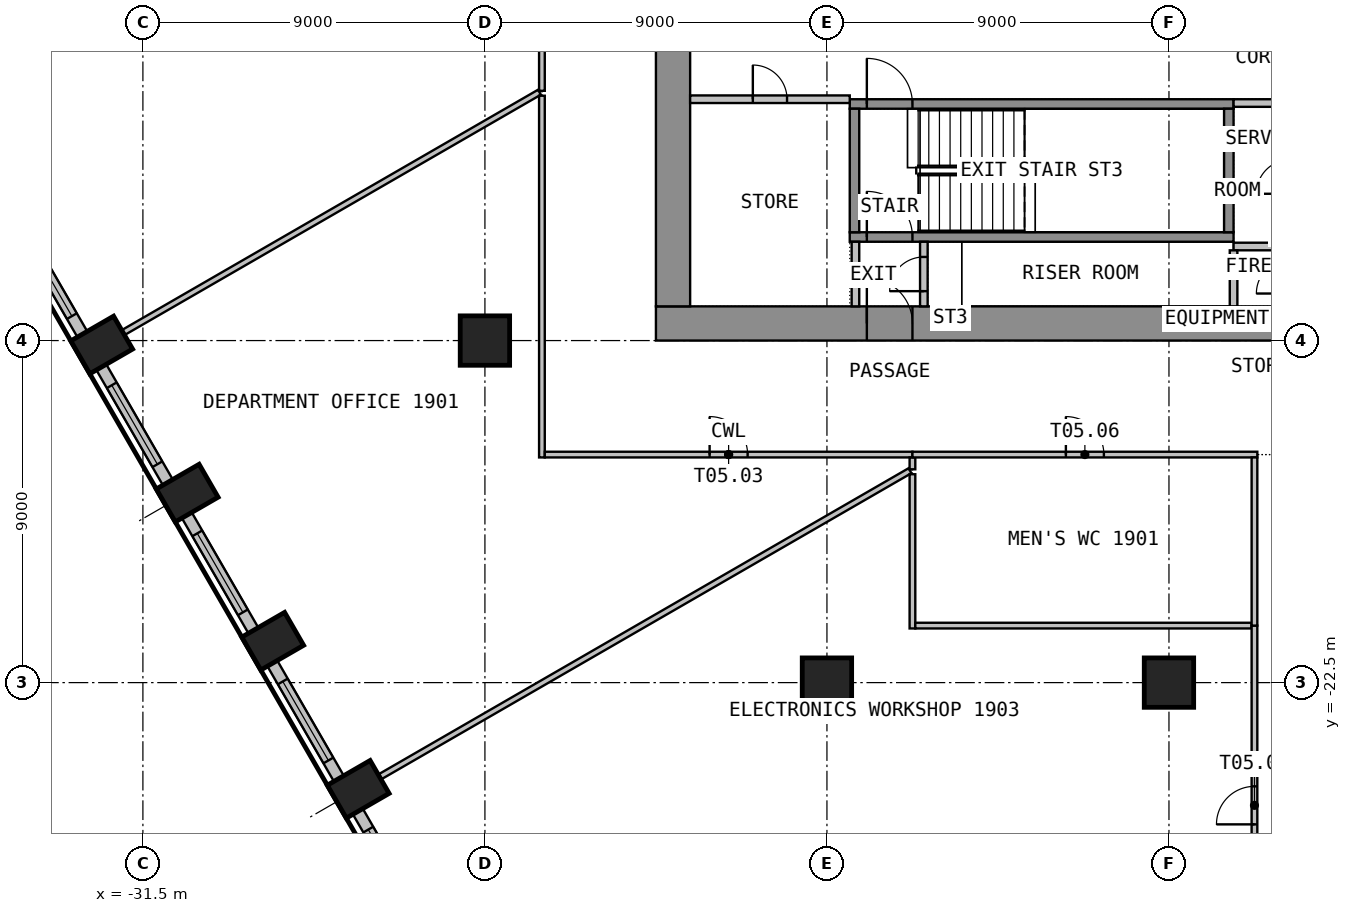
"""IFC4 building model, lengths in metres.
Left out: names, types, materials, properties, quantities, classifications, styles, units other than length and angle.
Written with IfcOpenShell. Run it as: python <this file> out.ifc"""

import sys

from ifc_helpers import new_model, si_unit, direction, frame, frame_2d, origin, origin_2d, place, context, subcontext, project, spatial, rectangle, circle, extrude, element, fill, save


model = new_model("IFC4")
c1 = context("Model", 3, precision=1e-05, world=origin(), true_north=direction((0.0, 1.0)))
c2 = subcontext(c1, "Body", "Model", "MODEL_VIEW")
j1 = project(units=[si_unit("LENGTHUNIT", "METRE"), si_unit("PLANEANGLEUNIT", "RADIAN")], contexts=[c1])
p1 = place(None, origin())
s1 = spatial("IfcSite", under=j1, at=p1, CompositionType="ELEMENT")
p2 = place(p1, origin())
s2 = spatial("IfcBuilding", under=s1, at=p2, CompositionType="ELEMENT")
p3 = place(p2, frame((0.0, 0.0, 81.3)))
s3 = spatial("IfcBuildingStorey", under=s2, at=p3, CompositionType="ELEMENT", Elevation=81.3)
for number, where, z_axis, x_axis in (
    (1, (-32.584, -13.616, 0.0), (0.0, 0.0, 1.0), (0.5, -0.866, 0.0)),
    (2, (-30.334, -17.513, 0.0), (0.0, 0.0, 1.0), (0.5, -0.866, 0.0)),
    (3, (-28.084, -21.411, 0.0), (0.0, 0.0, 1.0), (0.5, -0.866, 0.0)),
    (4, (-25.834, -25.308, 0.0), (0.0, 0.0, 1.0), (0.5, -0.866, 0.0)),
):
    element("IfcColumn", number, at=place(p3, frame(where, z_axis=z_axis, x_axis=x_axis)), inside=s3, PredefinedType="COLUMN", context=c2, shape_type="SweptSolid", body=[
        extrude(rectangle(XDim=1.0, YDim=1.3, at=origin_2d()), origin(), (0.0, 0.0, 1.0), 3.525),
    ])
for number, where, z_axis, x_axis in (
    (5, (-22.5, -13.5, 0.0), (0.0, 0.0, 1.0), (1.0, 0.0, 0.0)),
    (6, (-13.5, -22.5, 0.0), (0.0, 0.0, 1.0), (1.0, 0.0, 0.0)),
    (7, (-4.5, -22.5, 0.0), (0.0, 0.0, 1.0), (1.0, 0.0, 0.0)),
):
    element("IfcColumn", number, at=place(p3, frame(where, z_axis=z_axis, x_axis=x_axis)), inside=s3, PredefinedType="COLUMN", context=c2, shape_type="SweptSolid", body=[
        extrude(circle(Radius=0.65, at=origin_2d()), origin(), (0.0, 0.0, 1.0), 3.525),
    ])
p4 = place(p3, frame((-34.844, -10.303, 0.0), z_axis=(0.0, 0.0, 1.0), x_axis=(0.499996256241, -0.866027565234, 0.0)))
e8 = element("IfcWall", 8, at=p4, inside=s3, PredefinedType="SOLIDWALL", context=c2, shape_type="SweptSolid", body=[
    extrude(rectangle(XDim=3.499, YDim=0.3, at=frame_2d((1.75, 0.0))), origin(), (0.0, 0.0, 1.0), 3.525),
])
p5 = place(p4, frame((0.55, 0.0, 0.9)))
e9 = element("IfcOpeningElement", 9, at=p5, cuts=e8, PredefinedType="OPENING", context=c2, shape_type="SweptSolid", body=[
    extrude(rectangle(XDim=2.4, YDim=2.1, at=frame_2d((1.2, 1.05))), frame((0.0, 0.16, 0.0), z_axis=(0.0, -1.0, 0.0), x_axis=(1.0, 0.0, 0.0)), (0.0, 0.0, 1.0), 0.32),
])
p6 = place(p3, frame((-32.594, -14.2, 0.0), z_axis=(0.0, 0.0, 1.0), x_axis=(0.499996256241, -0.866027565234, 0.0)))
e10 = element("IfcWall", 10, at=p6, inside=s3, PredefinedType="SOLIDWALL", context=c2, shape_type="SweptSolid", body=[
    extrude(rectangle(XDim=3.499, YDim=0.3, at=frame_2d((1.75, 0.0))), origin(), (0.0, 0.0, 1.0), 3.525),
])
p7 = place(p6, frame((0.55, 0.0, 0.9)))
e11 = element("IfcOpeningElement", 11, at=p7, cuts=e10, PredefinedType="OPENING", context=c2, shape_type="SweptSolid", body=[
    extrude(rectangle(XDim=2.4, YDim=2.1, at=frame_2d((1.2, 1.05))), frame((0.0, 0.16, 0.0), z_axis=(0.0, -1.0, 0.0), x_axis=(1.0, 0.0, 0.0)), (0.0, 0.0, 1.0), 0.32),
])
p8 = place(p3, frame((-30.344, -18.097, 0.0), z_axis=(0.0, 0.0, 1.0), x_axis=(0.499996256241, -0.866027565234, 0.0)))
e12 = element("IfcWall", 12, at=p8, inside=s3, PredefinedType="SOLIDWALL", context=c2, shape_type="SweptSolid", body=[
    extrude(rectangle(XDim=3.499, YDim=0.3, at=frame_2d((1.75, 0.0))), origin(), (0.0, 0.0, 1.0), 3.525),
])
p9 = place(p8, frame((0.55, 0.0, 0.9)))
e13 = element("IfcOpeningElement", 13, at=p9, cuts=e12, PredefinedType="OPENING", context=c2, shape_type="SweptSolid", body=[
    extrude(rectangle(XDim=2.4, YDim=2.1, at=frame_2d((1.2, 1.05))), frame((0.0, 0.16, 0.0), z_axis=(0.0, -1.0, 0.0), x_axis=(1.0, 0.0, 0.0)), (0.0, 0.0, 1.0), 0.32),
])
p10 = place(p3, frame((-28.094, -21.994, 0.0), z_axis=(0.0, 0.0, 1.0), x_axis=(0.499996256241, -0.866027565234, 0.0)))
e14 = element("IfcWall", 14, at=p10, inside=s3, PredefinedType="SOLIDWALL", context=c2, shape_type="SweptSolid", body=[
    extrude(rectangle(XDim=3.499, YDim=0.3, at=frame_2d((1.75, 0.0))), origin(), (0.0, 0.0, 1.0), 3.525),
])
p11 = place(p10, frame((0.55, 0.0, 0.9)))
e15 = element("IfcOpeningElement", 15, at=p11, cuts=e14, PredefinedType="OPENING", context=c2, shape_type="SweptSolid", body=[
    extrude(rectangle(XDim=2.4, YDim=2.1, at=frame_2d((1.2, 1.05))), frame((0.0, 0.16, 0.0), z_axis=(0.0, -1.0, 0.0), x_axis=(1.0, 0.0, 0.0)), (0.0, 0.0, 1.0), 0.32),
])
p12 = place(p3, frame((-25.844, -25.891, 0.0), z_axis=(0.0, 0.0, 1.0), x_axis=(0.500004907028, -0.866022570692, 0.0)))
e16 = element("IfcWall", 16, at=p12, inside=s3, PredefinedType="SOLIDWALL", context=c2, shape_type="SweptSolid", body=[
    extrude(rectangle(XDim=3.192, YDim=0.3, at=frame_2d((1.596, 0.0))), origin(), (0.0, 0.0, 1.0), 3.525),
])
p13 = place(p12, frame((0.55, 0.0, 0.9)))
e17 = element("IfcOpeningElement", 17, at=p13, cuts=e16, PredefinedType="OPENING", context=c2, shape_type="SweptSolid", body=[
    extrude(rectangle(XDim=2.4, YDim=2.1, at=frame_2d((1.2, 1.05))), frame((0.0, 0.16, 0.0), z_axis=(0.0, -1.0, 0.0), x_axis=(1.0, 0.0, 0.0)), (0.0, 0.0, 1.0), 0.32),
])
p14 = place(p3, frame((-18.0, -13.05, 0.0), z_axis=(0.0, 0.0, 1.0), x_axis=(1.0, 0.0, 0.0)))
e18 = element("IfcWall", 18, at=p14, inside=s3, PredefinedType="SHEAR", context=c2, shape_type="SweptSolid", body=[
    extrude(rectangle(XDim=36.0, YDim=0.9, at=frame_2d((18.0, 0.0))), origin(), (0.0, 0.0, 1.0), 3.525),
])
p15 = place(p14, frame((16.8, 0.0, 0.0)))
e19 = element("IfcOpeningElement", 19, at=p15, cuts=e18, PredefinedType="OPENING", context=c2, shape_type="SweptSolid", body=[
    extrude(rectangle(XDim=2.4, YDim=2.1, at=frame_2d((1.2, 1.05))), frame((0.0, 0.46, 0.0), z_axis=(0.0, -1.0, 0.0), x_axis=(1.0, 0.0, 0.0)), (0.0, 0.0, 1.0), 0.92),
])
p16 = place(p14, frame((5.55, 0.0, 0.0)))
e20 = element("IfcOpeningElement", 20, at=p16, cuts=e18, PredefinedType="OPENING", context=c2, shape_type="SweptSolid", body=[
    extrude(rectangle(XDim=1.2, YDim=2.1, at=frame_2d((0.6, 1.05))), frame((0.0, 0.46, 0.0), z_axis=(0.0, -1.0, 0.0), x_axis=(1.0, 0.0, 0.0)), (0.0, 0.0, 1.0), 0.92),
])
p17 = place(p14, frame((29.25, 0.0, 0.0)))
e21 = element("IfcOpeningElement", 21, at=p17, cuts=e18, PredefinedType="OPENING", context=c2, shape_type="SweptSolid", body=[
    extrude(rectangle(XDim=1.2, YDim=2.1, at=frame_2d((0.6, 1.05))), frame((0.0, 0.46, 0.0), z_axis=(0.0, -1.0, 0.0), x_axis=(1.0, 0.0, 0.0)), (0.0, 0.0, 1.0), 0.92),
])
p18 = place(p3, frame((-17.55, -12.6, 0.0), z_axis=(0.0, 0.0, 1.0), x_axis=(0.0, 1.0, 0.0)))
e22 = element("IfcWall", 22, at=p18, inside=s3, PredefinedType="SHEAR", context=c2, shape_type="SweptSolid", body=[
    extrude(rectangle(XDim=25.2, YDim=0.9, at=frame_2d((12.6, 0.0))), origin(), (0.0, 0.0, 1.0), 3.525),
])
p19 = place(p18, frame((11.4, 0.0, 0.0)))
e23 = element("IfcOpeningElement", 23, at=p19, cuts=e22, PredefinedType="OPENING", context=c2, shape_type="SweptSolid", body=[
    extrude(rectangle(XDim=2.4, YDim=2.1, at=frame_2d((1.2, 1.05))), frame((0.0, 0.46, 0.0), z_axis=(0.0, -1.0, 0.0), x_axis=(1.0, 0.0, 0.0)), (0.0, 0.0, 1.0), 0.92),
])
p20 = place(p3, frame((-12.9, -10.775, 0.0), z_axis=(0.0, 0.0, 1.0), x_axis=(1.0, 0.0, 0.0)))
e24 = element("IfcWall", 24, at=p20, inside=s3, PredefinedType="SHEAR", context=c2, shape_type="SweptSolid", body=[
    extrude(rectangle(XDim=10.1, YDim=0.25, at=frame_2d((5.05, 0.0))), origin(), (0.0, 0.0, 1.0), 3.525),
])
p21 = place(p20, frame((0.45, 0.0, 0.0)))
e25 = element("IfcOpeningElement", 25, at=p21, cuts=e24, PredefinedType="OPENING", context=c2, shape_type="SweptSolid", body=[
    extrude(rectangle(XDim=1.2, YDim=2.1, at=frame_2d((0.6, 1.05))), frame((0.0, 0.135, 0.0), z_axis=(0.0, -1.0, 0.0), x_axis=(1.0, 0.0, 0.0)), (0.0, 0.0, 1.0), 0.27),
])
p22 = place(p3, frame((-12.9, -7.275, 0.0), z_axis=(0.0, 0.0, 1.0), x_axis=(1.0, 0.0, 0.0)))
e26 = element("IfcWall", 26, at=p22, inside=s3, PredefinedType="SHEAR", context=c2, shape_type="SweptSolid", body=[
    extrude(rectangle(XDim=10.1, YDim=0.25, at=frame_2d((5.05, 0.0))), origin(), (0.0, 0.0, 1.0), 3.525),
])
p23 = place(p22, frame((0.45, 0.0, 0.0)))
e27 = element("IfcOpeningElement", 27, at=p23, cuts=e26, PredefinedType="OPENING", context=c2, shape_type="SweptSolid", body=[
    extrude(rectangle(XDim=1.2, YDim=2.1, at=frame_2d((0.6, 1.05))), frame((0.0, 0.135, 0.0), z_axis=(0.0, -1.0, 0.0), x_axis=(1.0, 0.0, 0.0)), (0.0, 0.0, 1.0), 0.27),
])
for number, where, z_axis, x_axis in (
    (28, (-12.775, -10.65, 0.0), (0.0, 0.0, 1.0), (0.0, 1.0, 0.0)),
    (29, (-2.925, -10.65, 0.0), (0.0, 0.0, 1.0), (0.0, 1.0, 0.0)),
):
    element("IfcWall", number, at=place(p3, frame(where, z_axis=z_axis, x_axis=x_axis)), inside=s3, PredefinedType="SHEAR", context=c2, shape_type="SweptSolid", body=[
        extrude(rectangle(XDim=3.25, YDim=0.25, at=frame_2d((1.625, 0.0))), origin(), (0.0, 0.0, 1.0), 3.525),
    ])
for number, where, z_axis, x_axis in (
    (30, (-2.8, -7.25, 0.0), (0.0, 0.0, 1.0), (1.0, 0.0, 0.0)),
    (31, (-2.8, -11.025, 0.0), (0.0, 0.0, 1.0), (1.0, 0.0, 0.0)),
):
    element("IfcWall", number, at=place(p3, frame(where, z_axis=z_axis, x_axis=x_axis)), inside=s3, PredefinedType="PARTITIONING", context=c2, shape_type="SweptSolid", body=[
        extrude(rectangle(XDim=1.4, YDim=0.2, at=frame_2d((0.7, 0.0))), origin(), (0.0, 0.0, 1.0), 3.525),
    ])
p24 = place(p3, frame((-12.75, -12.6, 0.0), z_axis=(0.0, 0.0, 1.0), x_axis=(0.0, 1.0, 0.0)))
e32 = element("IfcWall", 32, at=p24, inside=s3, PredefinedType="PARTITIONING", context=c2, shape_type="SweptSolid", body=[
    extrude(rectangle(XDim=1.7, YDim=0.2, at=frame_2d((0.85, 0.0))), origin(), (0.0, 0.0, 1.0), 3.525),
])
p25 = place(p3, frame((-10.95, -12.6, 0.0), z_axis=(0.0, 0.0, 1.0), x_axis=(0.0, 1.0, 0.0)))
e33 = element("IfcWall", 33, at=p25, inside=s3, PredefinedType="PARTITIONING", context=c2, shape_type="SweptSolid", body=[
    extrude(rectangle(XDim=1.7, YDim=0.2, at=frame_2d((0.85, 0.0))), origin(), (0.0, 0.0, 1.0), 3.525),
])
p26 = place(p25, frame((0.4, 0.0, 0.0)))
e34 = element("IfcOpeningElement", 34, at=p26, cuts=e33, PredefinedType="OPENING", context=c2, shape_type="SweptSolid", body=[
    extrude(rectangle(XDim=0.9, YDim=2.1, at=frame_2d((0.45, 1.05))), frame((0.0, 0.11, 0.0), z_axis=(0.0, -1.0, 0.0), x_axis=(1.0, 0.0, 0.0)), (0.0, 0.0, 1.0), 0.22),
])
p27 = place(p3, frame((-17.1, -7.15, 0.0), z_axis=(0.0, 0.0, 1.0), x_axis=(1.0, 0.0, 0.0)))
e35 = element("IfcWall", 35, at=p27, inside=s3, PredefinedType="PARTITIONING", context=c2, shape_type="SweptSolid", body=[
    extrude(rectangle(XDim=4.2, YDim=0.2, at=frame_2d((2.1, 0.0))), origin(), (0.0, 0.0, 1.0), 3.525),
])
p28 = place(p27, frame((1.65, 0.0, 0.0)))
e36 = element("IfcOpeningElement", 36, at=p28, cuts=e35, PredefinedType="OPENING", context=c2, shape_type="SweptSolid", body=[
    extrude(rectangle(XDim=0.9, YDim=2.1, at=frame_2d((0.45, 1.05))), frame((0.0, 0.11, 0.0), z_axis=(0.0, -1.0, 0.0), x_axis=(1.0, 0.0, 0.0)), (0.0, 0.0, 1.0), 0.22),
])
p29 = place(p3, frame((-21.065, -6.966, 0.0), z_axis=(0.0, 0.0, 1.0), x_axis=(-0.866023362995, -0.500003534735, 0.0)))
e37 = element("IfcWall", 37, at=p29, inside=s3, PredefinedType="PARTITIONING", context=c2, shape_type="SweptSolid", body=[
    extrude(rectangle(XDim=12.631, YDim=0.15, at=frame_2d((6.316, 0.0))), origin(), (0.0, 0.0, 1.0), 3.525),
])
p30 = place(p3, frame((-11.315, -16.925, 0.0), z_axis=(0.0, 0.0, 1.0), x_axis=(-0.86600725109, -0.500031440071, 0.0)))
e38 = element("IfcWall", 38, at=p30, inside=s3, PredefinedType="PARTITIONING", context=c2, shape_type="SweptSolid", body=[
    extrude(rectangle(XDim=16.096, YDim=0.15, at=frame_2d((8.048, 0.0))), origin(), (0.0, 0.0, 1.0), 3.525),
])
p31 = place(p3, frame((-21.0, -7.058, 0.0), z_axis=(0.0, 0.0, 1.0), x_axis=(0.0, -1.0, 0.0)))
e39 = element("IfcWall", 39, at=p31, inside=s3, PredefinedType="PARTITIONING", context=c2, shape_type="SweptSolid", body=[
    extrude(rectangle(XDim=9.517, YDim=0.15, at=frame_2d((4.758, 0.0))), origin(), (0.0, 0.0, 1.0), 3.525),
])
p32 = place(p3, frame((-20.925, -16.5, 0.0), z_axis=(0.0, 0.0, 1.0), x_axis=(1.0, 0.0, 0.0)))
e40 = element("IfcWall", 40, at=p32, inside=s3, PredefinedType="PARTITIONING", context=c2, shape_type="SweptSolid", body=[
    extrude(rectangle(XDim=9.675, YDim=0.15, at=frame_2d((4.837, 0.0))), origin(), (0.0, 0.0, 1.0), 3.525),
])
p33 = place(p32, frame((4.337, 0.0, 0.0)))
e41 = element("IfcOpeningElement", 41, at=p33, cuts=e40, PredefinedType="OPENING", context=c2, shape_type="SweptSolid", body=[
    extrude(rectangle(XDim=1.0, YDim=2.1, at=frame_2d((0.5, 1.05))), frame((0.0, 0.085, 0.0), z_axis=(0.0, -1.0, 0.0), x_axis=(1.0, 0.0, 0.0)), (0.0, 0.0, 1.0), 0.17),
])
p34 = place(p3, frame((-21.0, 2.813, 0.0), z_axis=(0.0, 0.0, 1.0), x_axis=(0.0, -1.0, 0.0)))
e42 = element("IfcWall", 42, at=p34, inside=s3, PredefinedType="PARTITIONING", context=c2, shape_type="SweptSolid", body=[
    extrude(rectangle(XDim=9.741, YDim=0.15, at=frame_2d((4.871, 0.0))), origin(), (0.0, 0.0, 1.0), 3.525),
])
p35 = place(p34, frame((4.371, 0.0, 0.0)))
e43 = element("IfcOpeningElement", 43, at=p35, cuts=e42, PredefinedType="OPENING", context=c2, shape_type="SweptSolid", body=[
    extrude(rectangle(XDim=1.0, YDim=2.1, at=frame_2d((0.5, 1.05))), frame((0.0, 0.085, 0.0), z_axis=(0.0, -1.0, 0.0), x_axis=(1.0, 0.0, 0.0)), (0.0, 0.0, 1.0), 0.17),
])
p36 = place(p3, frame((-11.25, -17.017, 0.0), z_axis=(0.0, 0.0, 1.0), x_axis=(0.0, -1.0, 0.0)))
e44 = element("IfcWall", 44, at=p36, inside=s3, PredefinedType="PARTITIONING", context=c2, shape_type="SweptSolid", body=[
    extrude(rectangle(XDim=4.058, YDim=0.15, at=frame_2d((2.029, 0.0))), origin(), (0.0, 0.0, 1.0), 3.525),
])
p37 = place(p3, frame((-11.175, -21.0, 0.0), z_axis=(0.0, 0.0, 1.0), x_axis=(1.0, 0.0, 0.0)))
e45 = element("IfcWall", 45, at=p37, inside=s3, PredefinedType="PARTITIONING", context=c2, shape_type="SweptSolid", body=[
    extrude(rectangle(XDim=8.85, YDim=0.15, at=frame_2d((4.425, 0.0))), origin(), (0.0, 0.0, 1.0), 3.525),
])
p38 = place(p3, frame((-11.25, -16.575, 0.0), z_axis=(0.0, 0.0, 1.0), x_axis=(0.0, -1.0, 0.0)))
e46 = element("IfcWall", 46, at=p38, inside=s3, PredefinedType="PARTITIONING", context=c2, shape_type="SweptSolid", body=[
    extrude(rectangle(XDim=0.312, YDim=0.15, at=frame_2d((0.156, 0.0))), origin(), (0.0, 0.0, 1.0), 3.525),
])
p39 = place(p3, frame((-11.25, -16.5, 0.0), z_axis=(0.0, 0.0, 1.0), x_axis=(1.0, 0.0, 0.0)))
e47 = element("IfcWall", 47, at=p39, inside=s3, PredefinedType="PARTITIONING", context=c2, shape_type="SweptSolid", body=[
    extrude(rectangle(XDim=9.075, YDim=0.15, at=frame_2d((4.538, 0.0))), origin(), (0.0, 0.0, 1.0), 3.525),
])
p40 = place(p39, frame((4.038, 0.0, 0.0)))
e48 = element("IfcOpeningElement", 48, at=p40, cuts=e47, PredefinedType="OPENING", context=c2, shape_type="SweptSolid", body=[
    extrude(rectangle(XDim=1.0, YDim=2.1, at=frame_2d((0.5, 1.05))), frame((0.0, 0.085, 0.0), z_axis=(0.0, -1.0, 0.0), x_axis=(1.0, 0.0, 0.0)), (0.0, 0.0, 1.0), 0.17),
])
p41 = place(p3, frame((-2.25, -30.46, 0.0), z_axis=(0.0, 0.0, 1.0), x_axis=(0.0, 1.0, 0.0)))
e49 = element("IfcWall", 49, at=p41, inside=s3, PredefinedType="PARTITIONING", context=c2, shape_type="SweptSolid", body=[
    extrude(rectangle(XDim=9.46, YDim=0.15, at=frame_2d((4.73, 0.0))), origin(), (0.0, 0.0, 1.0), 3.525),
])
p42 = place(p41, frame((4.23, 0.0, 0.0)))
e50 = element("IfcOpeningElement", 50, at=p42, cuts=e49, PredefinedType="OPENING", context=c2, shape_type="SweptSolid", body=[
    extrude(rectangle(XDim=1.0, YDim=2.1, at=frame_2d((0.5, 1.05))), frame((0.0, 0.085, 0.0), z_axis=(0.0, -1.0, 0.0), x_axis=(1.0, 0.0, 0.0)), (0.0, 0.0, 1.0), 0.17),
])
p43 = place(p3, frame((-2.25, -21.0, 0.0), z_axis=(0.0, 0.0, 1.0), x_axis=(0.0, 1.0, 0.0)))
e51 = element("IfcWall", 51, at=p43, inside=s3, PredefinedType="PARTITIONING", context=c2, shape_type="SweptSolid", body=[
    extrude(rectangle(XDim=4.425, YDim=0.15, at=frame_2d((2.212, 0.0))), origin(), (0.0, 0.0, 1.0), 3.525),
])
p44 = place(p3, frame((-2.8, -12.599, 0.0), z_axis=(0.0, 0.0, 1.0), x_axis=(0.0, 1.0, 0.0)))
e52 = element("IfcWall", 52, at=p44, inside=s3, PredefinedType="PARTITIONING", context=c2, shape_type="SweptSolid", body=[
    extrude(rectangle(XDim=1.473, YDim=0.2, at=frame_2d((0.737, 0.0))), origin(), (0.0, 0.0, 1.0), 3.525),
])
p45 = place(p5, origin())
e53 = element("IfcWindow", 53, at=p45, inside=s3, PartitioningType="SINGLE_PANEL", PredefinedType="WINDOW", context=c2, shape_type="SweptSolid", body=[
    extrude(rectangle(XDim=2.4, YDim=2.1, at=frame_2d((1.2, 1.05))), frame((0.0, 0.03, 0.0), z_axis=(0.0, -1.0, 0.0), x_axis=(1.0, 0.0, 0.0)), (0.0, 0.0, 1.0), 0.06),
])
fill(e9, e53)
p46 = place(p7, origin())
e54 = element("IfcWindow", 54, at=p46, inside=s3, PartitioningType="SINGLE_PANEL", PredefinedType="WINDOW", context=c2, shape_type="SweptSolid", body=[
    extrude(rectangle(XDim=2.4, YDim=2.1, at=frame_2d((1.2, 1.05))), frame((0.0, 0.03, 0.0), z_axis=(0.0, -1.0, 0.0), x_axis=(1.0, 0.0, 0.0)), (0.0, 0.0, 1.0), 0.06),
])
fill(e11, e54)
p47 = place(p9, origin())
e55 = element("IfcWindow", 55, at=p47, inside=s3, PartitioningType="SINGLE_PANEL", PredefinedType="WINDOW", context=c2, shape_type="SweptSolid", body=[
    extrude(rectangle(XDim=2.4, YDim=2.1, at=frame_2d((1.2, 1.05))), frame((0.0, 0.03, 0.0), z_axis=(0.0, -1.0, 0.0), x_axis=(1.0, 0.0, 0.0)), (0.0, 0.0, 1.0), 0.06),
])
fill(e13, e55)
p48 = place(p11, origin())
e56 = element("IfcWindow", 56, at=p48, inside=s3, PartitioningType="SINGLE_PANEL", PredefinedType="WINDOW", context=c2, shape_type="SweptSolid", body=[
    extrude(rectangle(XDim=2.4, YDim=2.1, at=frame_2d((1.2, 1.05))), frame((0.0, 0.03, 0.0), z_axis=(0.0, -1.0, 0.0), x_axis=(1.0, 0.0, 0.0)), (0.0, 0.0, 1.0), 0.06),
])
fill(e15, e56)
p49 = place(p13, origin())
e57 = element("IfcWindow", 57, at=p49, inside=s3, PartitioningType="SINGLE_PANEL", PredefinedType="WINDOW", context=c2, shape_type="SweptSolid", body=[
    extrude(rectangle(XDim=2.4, YDim=2.1, at=frame_2d((1.2, 1.05))), frame((0.0, 0.03, 0.0), z_axis=(0.0, -1.0, 0.0), x_axis=(1.0, 0.0, 0.0)), (0.0, 0.0, 1.0), 0.06),
])
fill(e17, e57)
p50 = place(p16, origin())
e58 = element("IfcDoor", 58, at=p50, inside=s3, OperationType="SINGLE_SWING_RIGHT", PredefinedType="DOOR", context=c2, shape_type="SweptSolid", body=[
    extrude(rectangle(XDim=1.2, YDim=2.1, at=frame_2d((0.6, 1.05))), frame((0.0, 0.025, 0.0), z_axis=(0.0, -1.0, 0.0), x_axis=(1.0, 0.0, 0.0)), (0.0, 0.0, 1.0), 0.05),
])
fill(e20, e58)
p51 = place(p23, origin())
e59 = element("IfcDoor", 59, at=p51, inside=s3, OperationType="SINGLE_SWING_LEFT", PredefinedType="DOOR", context=c2, shape_type="SweptSolid", body=[
    extrude(rectangle(XDim=1.2, YDim=2.1, at=frame_2d((0.6, 1.05))), frame((0.0, 0.025, 0.0), z_axis=(0.0, -1.0, 0.0), x_axis=(1.0, 0.0, 0.0)), (0.0, 0.0, 1.0), 0.05),
])
fill(e27, e59)
p52 = place(p21, origin())
e60 = element("IfcDoor", 60, at=p52, inside=s3, OperationType="SINGLE_SWING_RIGHT", PredefinedType="DOOR", context=c2, shape_type="SweptSolid", body=[
    extrude(rectangle(XDim=1.2, YDim=2.1, at=frame_2d((0.6, 1.05))), frame((0.0, 0.025, 0.0), z_axis=(0.0, -1.0, 0.0), x_axis=(1.0, 0.0, 0.0)), (0.0, 0.0, 1.0), 0.05),
])
fill(e25, e60)
p53 = place(p26, origin())
e61 = element("IfcDoor", 61, at=p53, inside=s3, OperationType="SINGLE_SWING_LEFT", PredefinedType="DOOR", context=c2, shape_type="SweptSolid", body=[
    extrude(rectangle(XDim=0.9, YDim=2.1, at=frame_2d((0.45, 1.05))), frame((0.0, 0.025, 0.0), z_axis=(0.0, -1.0, 0.0), x_axis=(1.0, 0.0, 0.0)), (0.0, 0.0, 1.0), 0.05),
])
fill(e34, e61)
p54 = place(p28, origin())
e62 = element("IfcDoor", 62, at=p54, inside=s3, OperationType="SINGLE_SWING_LEFT", PredefinedType="DOOR", context=c2, shape_type="SweptSolid", body=[
    extrude(rectangle(XDim=0.9, YDim=2.1, at=frame_2d((0.45, 1.05))), frame((0.0, 0.025, 0.0), z_axis=(0.0, -1.0, 0.0), x_axis=(1.0, 0.0, 0.0)), (0.0, 0.0, 1.0), 0.05),
])
fill(e36, e62)
p55 = place(p33, origin())
e63 = element("IfcDoor", 63, at=p55, inside=s3, OperationType="SINGLE_SWING_LEFT", PredefinedType="DOOR", context=c2, shape_type="SweptSolid", body=[
    extrude(rectangle(XDim=1.0, YDim=2.1, at=frame_2d((0.5, 1.05))), frame((0.0, 0.025, 0.0), z_axis=(0.0, -1.0, 0.0), x_axis=(1.0, 0.0, 0.0)), (0.0, 0.0, 1.0), 0.05),
])
fill(e41, e63)
p56 = place(p42, origin())
e64 = element("IfcDoor", 64, at=p56, inside=s3, OperationType="SINGLE_SWING_RIGHT", PredefinedType="DOOR", context=c2, shape_type="SweptSolid", body=[
    extrude(rectangle(XDim=1.0, YDim=2.1, at=frame_2d((0.5, 1.05))), frame((0.0, 0.025, 0.0), z_axis=(0.0, -1.0, 0.0), x_axis=(1.0, 0.0, 0.0)), (0.0, 0.0, 1.0), 0.05),
])
fill(e50, e64)
p57 = place(p40, origin())
e65 = element("IfcDoor", 65, at=p57, inside=s3, OperationType="SINGLE_SWING_RIGHT", PredefinedType="DOOR", context=c2, shape_type="SweptSolid", body=[
    extrude(rectangle(XDim=1.0, YDim=2.1, at=frame_2d((0.5, 1.05))), frame((0.0, 0.025, 0.0), z_axis=(0.0, -1.0, 0.0), x_axis=(1.0, 0.0, 0.0)), (0.0, 0.0, 1.0), 0.05),
])
fill(e48, e65)
save(model, sys.argv[1])
